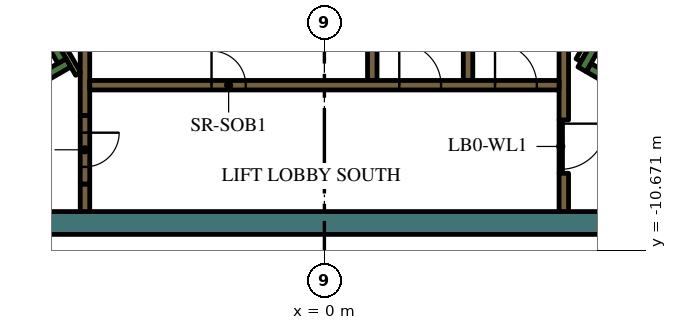
"""IFC4 building model, lengths in metres.
Left out: names, types, materials, properties, quantities, classifications, styles, units other than length and angle.
Written with IfcOpenShell. Run it as: python <this file> out.ifc"""

import sys

from ifc_helpers import new_model, si_unit, direction, frame, frame_2d, origin, place, context, subcontext, project, spatial, rectangle, extrude, element, fill, save


model = new_model("IFC4")
c1 = context("Model", 3, precision=1e-05, world=origin(), true_north=direction((0.0, 1.0)))
c2 = subcontext(c1, "Body", "Model", "MODEL_VIEW")
j1 = project(units=[si_unit("LENGTHUNIT", "METRE"), si_unit("PLANEANGLEUNIT", "RADIAN")], contexts=[c1])
p1 = place(None, origin())
s1 = spatial("IfcSite", under=j1, at=p1, CompositionType="ELEMENT")
p2 = place(p1, origin())
s2 = spatial("IfcBuilding", under=s1, at=p2, CompositionType="ELEMENT")
p3 = place(p2, frame((0.0, 0.0, 271.2)))
s3 = spatial("IfcBuildingStorey", under=s2, at=p3, CompositionType="ELEMENT", Elevation=271.2)
p4 = place(p3, frame((8.904, -9.95, 0.0), z_axis=(0.0, 0.0, 1.0), x_axis=(-1.0, 0.0, 0.0)))
e1 = element("IfcWall", 1, at=p4, inside=s3, PredefinedType="SOLIDWALL", context=c2, shape_type="SweptSolid", body=[
    extrude(rectangle(XDim=22.161, YDim=0.6, at=frame_2d((11.081, 0.0))), origin(), (0.0, 0.0, 1.0), 4.2),
])
p5 = place(p3, frame((12.84, -9.261, 0.0), z_axis=(0.0, 0.0, 1.0), x_axis=(-0.866013990052, 0.500019768644, 0.0)))
e2 = element("IfcWall", 2, at=p5, inside=s3, PredefinedType="SOLIDWALL", context=c2, shape_type="SweptSolid", body=[
    extrude(rectangle(XDim=6.8, YDim=0.25, at=frame_2d((3.4, 0.0))), origin(), (0.0, 0.0, 1.0), 4.2),
])
p6 = place(p3, frame((6.78, -5.906, 0.0), z_axis=(0.0, 0.0, 1.0), x_axis=(0.500223362819, 0.865896406789, 0.0)))
e3 = element("IfcWall", 3, at=p6, inside=s3, PredefinedType="SOLIDWALL", context=c2, shape_type="SweptSolid", body=[
    extrude(rectangle(XDim=0.675, YDim=0.25, at=frame_2d((0.337, 0.0))), origin(), (0.0, 0.0, 1.0), 4.2),
])
p7 = place(p3, frame((-12.84, -9.261, 0.0), z_axis=(0.0, 0.0, 1.0), x_axis=(0.866016039709, 0.500016218704, 0.0)))
e4 = element("IfcWall", 4, at=p7, inside=s3, PredefinedType="SOLIDWALL", context=c2, shape_type="SweptSolid", body=[
    extrude(rectangle(XDim=7.05, YDim=0.25, at=frame_2d((3.525, 0.0))), origin(), (0.0, 0.0, 1.0), 4.2),
])
p8 = place(p3, frame((-6.905, -5.69, 0.0), z_axis=(0.0, 0.0, 1.0), x_axis=(-0.500402024738, 0.865793170242, 0.0)))
e5 = element("IfcWall", 5, at=p8, inside=s3, PredefinedType="SOLIDWALL", context=c2, shape_type="SweptSolid", body=[
    extrude(rectangle(XDim=0.425, YDim=0.25, at=frame_2d((0.212, 0.0))), origin(), (0.0, 0.0, 1.0), 4.2),
])
p9 = place(p3, frame((6.3, -7.24, 0.0), z_axis=(0.0, 0.0, 1.0), x_axis=(0.0, 1.0, 0.0)))
e6 = element("IfcWall", 6, at=p9, inside=s3, PredefinedType="SOLIDWALL", context=c2, shape_type="SweptSolid", body=[
    extrude(rectangle(XDim=3.556, YDim=0.25, at=frame_2d((1.778, 0.0))), origin(), (0.0, 0.0, 1.0), 4.2),
])
p10 = place(p3, frame((6.3, -9.65, 0.0), z_axis=(0.0, 0.0, 1.0), x_axis=(0.0, 1.0, 0.0)))
e7 = element("IfcWall", 7, at=p10, inside=s3, PredefinedType="SOLIDWALL", context=c2, shape_type="SweptSolid", body=[
    extrude(rectangle(XDim=1.008, YDim=0.25, at=frame_2d((0.504, 0.0))), origin(), (0.0, 0.0, 1.0), 4.2),
])
for number, where, z_axis, x_axis in (
    (8, (1.26, -4.0, 0.0), (0.0, 0.0, 1.0), (0.0, -1.0, 0.0)),
    (9, (3.78, -4.0, 0.0), (0.0, 0.0, 1.0), (0.0, -1.0, 0.0)),
):
    element("IfcWall", number, at=place(p3, frame(where, z_axis=z_axis, x_axis=x_axis)), inside=s3, PredefinedType="SOLIDWALL", context=c2, shape_type="SweptSolid", body=[
        extrude(rectangle(XDim=2.2, YDim=0.25, at=frame_2d((1.1, 0.0))), origin(), (0.0, 0.0, 1.0), 4.2),
    ])
p11 = place(p3, frame((-6.3, -7.125, 0.0), z_axis=(0.0, 0.0, 1.0), x_axis=(0.0, 1.0, 0.0)))
e10 = element("IfcWall", 10, at=p11, inside=s3, PredefinedType="SOLIDWALL", context=c2, shape_type="SweptSolid", body=[
    extrude(rectangle(XDim=3.375, YDim=0.25, at=frame_2d((1.687, 0.0))), origin(), (0.0, 0.0, 1.0), 4.2),
])
p12 = place(p3, frame((-6.3, -8.925, 0.0), z_axis=(0.0, 0.0, 1.0), x_axis=(0.0, -1.0, 0.0)))
e11 = element("IfcWall", 11, at=p12, inside=s3, PredefinedType="SOLIDWALL", context=c2, shape_type="SweptSolid", body=[
    extrude(rectangle(XDim=0.725, YDim=0.25, at=frame_2d((0.363, 0.0))), origin(), (0.0, 0.0, 1.0), 4.2),
])
p13 = place(p3, frame((-6.48, -6.027, 0.0), z_axis=(0.0, 0.0, 1.0), x_axis=(-0.499927229454, 0.866067413802, 0.0)))
e12 = element("IfcWall", 12, at=p13, inside=s3, PredefinedType="PARTITIONING", context=c2, shape_type="SweptSolid", body=[
    extrude(rectangle(XDim=0.929, YDim=0.15, at=frame_2d((0.464, 0.0))), origin(), (0.0, 0.0, 1.0), 4.2),
])
p14 = place(p3, frame((6.945, -5.222, 0.0), z_axis=(0.0, 0.0, 1.0), x_axis=(-0.499818422106, -0.866130212453, 0.0)))
e13 = element("IfcWall", 13, at=p14, inside=s3, PredefinedType="PARTITIONING", context=c2, shape_type="SweptSolid", body=[
    extrude(rectangle(XDim=0.514, YDim=0.15, at=frame_2d((0.257, 0.0))), origin(), (0.0, 0.0, 1.0), 3.55),
])
p15 = place(p3, frame((-6.175, -6.325, 0.0), z_axis=(0.0, 0.0, 1.0), x_axis=(1.0, 0.0, 0.0)))
e14 = element("IfcWall", 14, at=p15, inside=s3, PredefinedType="SOLIDWALL", context=c2, shape_type="SweptSolid", body=[
    extrude(rectangle(XDim=12.35, YDim=0.25, at=frame_2d((6.175, 0.0))), origin(), (0.0, 0.0, 1.0), 4.2),
])
p16 = place(p15, frame((3.205, 0.0, 0.0)))
e15 = element("IfcOpeningElement", 15, at=p16, cuts=e14, PredefinedType="OPENING", context=c2, shape_type="SweptSolid", body=[
    extrude(rectangle(XDim=0.9, YDim=2.1, at=frame_2d((0.45, 1.05))), frame((0.0, 0.135, 0.0), z_axis=(0.0, -1.0, 0.0), x_axis=(1.0, 0.0, 0.0)), (0.0, 0.0, 1.0), 0.27),
])
p17 = place(p15, frame((8.145, 0.0, 0.0)))
e16 = element("IfcOpeningElement", 16, at=p17, cuts=e14, PredefinedType="OPENING", context=c2, shape_type="SweptSolid", body=[
    extrude(rectangle(XDim=1.1, YDim=2.1, at=frame_2d((0.55, 1.05))), frame((0.0, 0.135, 0.0), z_axis=(0.0, -1.0, 0.0), x_axis=(1.0, 0.0, 0.0)), (0.0, 0.0, 1.0), 0.27),
])
p18 = place(p15, frame((10.665, 0.0, 0.0)))
e17 = element("IfcOpeningElement", 17, at=p18, cuts=e14, PredefinedType="OPENING", context=c2, shape_type="SweptSolid", body=[
    extrude(rectangle(XDim=1.1, YDim=2.1, at=frame_2d((0.55, 1.05))), frame((0.0, 0.135, 0.0), z_axis=(0.0, -1.0, 0.0), x_axis=(1.0, 0.0, 0.0)), (0.0, 0.0, 1.0), 0.27),
])
p19 = place(p3, frame((-6.3, -7.125, 0.0), z_axis=(0.0, 0.0, 1.0), x_axis=(0.0, -1.0, 0.0)))
e18 = element("IfcWall", 18, at=p19, inside=s3, PredefinedType="SOLIDWALL", context=c2, shape_type="SweptSolid", body=[
    extrude(rectangle(XDim=1.8, YDim=0.25, at=frame_2d((0.9, 0.0))), origin(), (0.0, 0.0, 1.0), 4.2),
])
p20 = place(p19, frame((0.45, 0.0, 0.0)))
e19 = element("IfcOpeningElement", 19, at=p20, cuts=e18, PredefinedType="OPENING", context=c2, shape_type="SweptSolid", body=[
    extrude(rectangle(XDim=0.9, YDim=2.1, at=frame_2d((0.45, 1.05))), frame((0.0, 0.135, 0.0), z_axis=(0.0, -1.0, 0.0), x_axis=(1.0, 0.0, 0.0)), (0.0, 0.0, 1.0), 0.27),
])
p21 = place(p3, frame((6.22, -7.237, 0.0), z_axis=(0.0, 0.0, 1.0), x_axis=(0.0, -1.0, 0.0)))
e20 = element("IfcWall", 20, at=p21, inside=s3, PredefinedType="PARTITIONING", context=c2, shape_type="SweptSolid", body=[
    extrude(rectangle(XDim=1.4, YDim=0.09, at=frame_2d((0.7, 0.0))), origin(), (0.0, 0.0, 1.0), 3.55),
])
p22 = place(p21, frame((0.1, 0.0, 0.0)))
e21 = element("IfcOpeningElement", 21, at=p22, cuts=e20, PredefinedType="OPENING", context=c2, shape_type="SweptSolid", body=[
    extrude(rectangle(XDim=1.2, YDim=2.1, at=frame_2d((0.6, 1.05))), frame((0.0, 0.055, 0.0), z_axis=(0.0, -1.0, 0.0), x_axis=(1.0, 0.0, 0.0)), (0.0, 0.0, 1.0), 0.11),
])
p23 = place(p16, origin())
e22 = element("IfcDoor", 22, at=p23, inside=s3, OperationType="SINGLE_SWING_LEFT", PredefinedType="DOOR", context=c2, shape_type="SweptSolid", body=[
    extrude(rectangle(XDim=0.9, YDim=2.1, at=frame_2d((0.45, 1.05))), frame((0.0, 0.025, 0.0), z_axis=(0.0, -1.0, 0.0), x_axis=(1.0, 0.0, 0.0)), (0.0, 0.0, 1.0), 0.05),
])
fill(e15, e22)
p24 = place(p17, origin())
e23 = element("IfcDoor", 23, at=p24, inside=s3, OperationType="DOUBLE_DOOR_SLIDING", PredefinedType="DOOR", context=c2, shape_type="SweptSolid", body=[
    extrude(rectangle(XDim=1.1, YDim=2.1, at=frame_2d((0.55, 1.05))), frame((0.0, 0.025, 0.0), z_axis=(0.0, -1.0, 0.0), x_axis=(1.0, 0.0, 0.0)), (0.0, 0.0, 1.0), 0.05),
])
fill(e16, e23)
p25 = place(p18, origin())
e24 = element("IfcDoor", 24, at=p25, inside=s3, OperationType="DOUBLE_DOOR_SLIDING", PredefinedType="DOOR", context=c2, shape_type="SweptSolid", body=[
    extrude(rectangle(XDim=1.1, YDim=2.1, at=frame_2d((0.55, 1.05))), frame((0.0, 0.025, 0.0), z_axis=(0.0, -1.0, 0.0), x_axis=(1.0, 0.0, 0.0)), (0.0, 0.0, 1.0), 0.05),
])
fill(e17, e24)
p26 = place(p20, origin())
e25 = element("IfcDoor", 25, at=p26, inside=s3, OperationType="SINGLE_SWING_LEFT", PredefinedType="DOOR", context=c2, shape_type="SweptSolid", body=[
    extrude(rectangle(XDim=0.9, YDim=2.1, at=frame_2d((0.45, 1.05))), frame((0.0, 0.025, 0.0), z_axis=(0.0, -1.0, 0.0), x_axis=(1.0, 0.0, 0.0)), (0.0, 0.0, 1.0), 0.05),
])
fill(e19, e25)
p27 = place(p22, origin())
e26 = element("IfcDoor", 26, at=p27, inside=s3, OperationType="SINGLE_SWING_LEFT", PredefinedType="DOOR", context=c2, shape_type="SweptSolid", body=[
    extrude(rectangle(XDim=1.2, YDim=2.1, at=frame_2d((0.6, 1.05))), frame((0.0, 0.025, 0.0), z_axis=(0.0, -1.0, 0.0), x_axis=(1.0, 0.0, 0.0)), (0.0, 0.0, 1.0), 0.05),
])
fill(e21, e26)
save(model, sys.argv[1])
